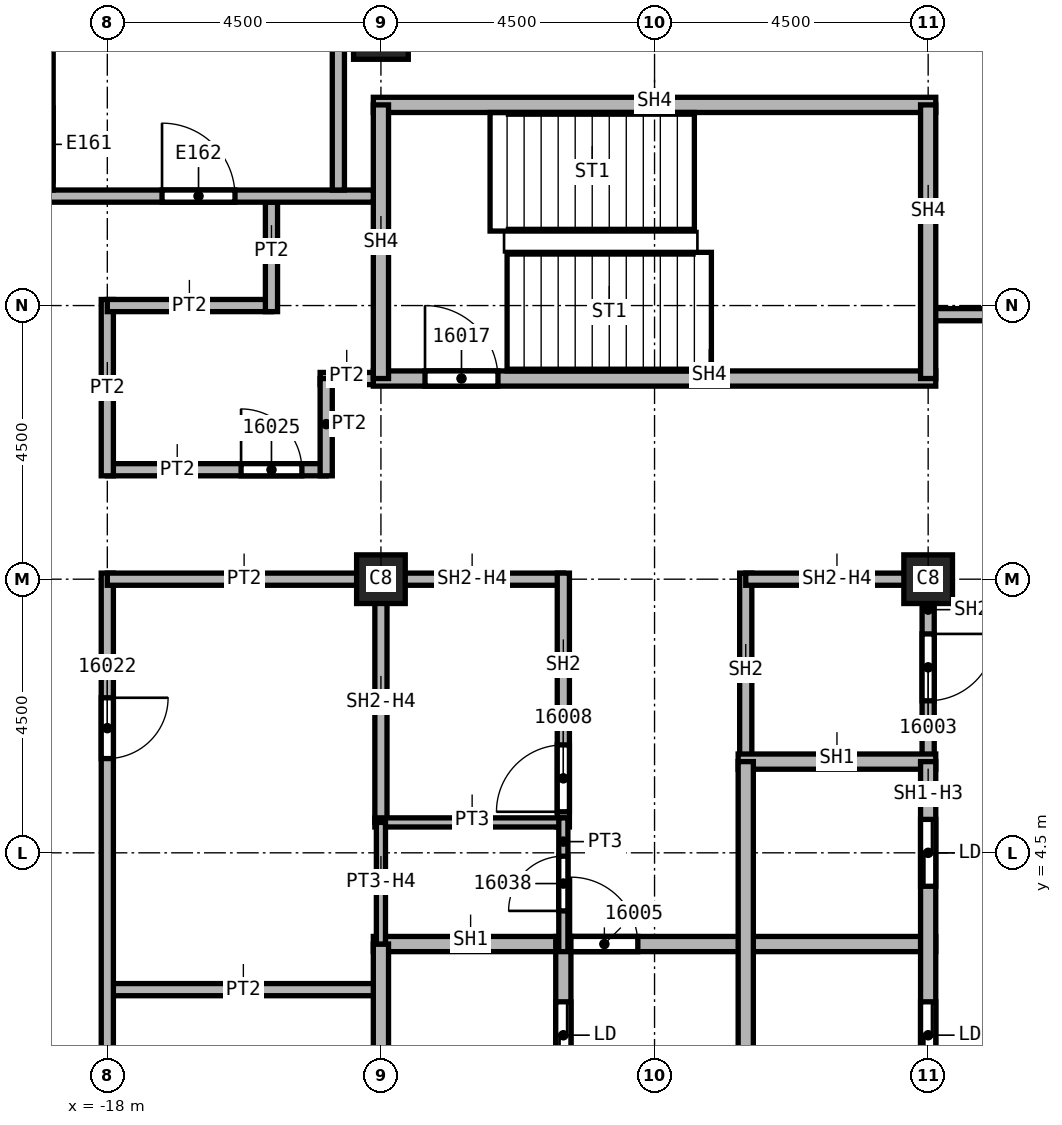
"""IFC4 building model, lengths in metres.
Left out: names, types, materials, properties, quantities, classifications, styles, units other than length and angle.
Written with IfcOpenShell. Run it as: python <this file> out.ifc"""

import sys

from ifc_helpers import new_model, si_unit, direction, frame, frame_2d, origin, origin_2d, place, context, subcontext, project, spatial, rectangle, extrude, element, fill, save


model = new_model("IFC4")
c1 = context("Model", 3, precision=1e-05, world=origin(), true_north=direction((0.0, 1.0)))
c2 = subcontext(c1, "Body", "Model", "MODEL_VIEW")
j1 = project(units=[si_unit("LENGTHUNIT", "METRE"), si_unit("PLANEANGLEUNIT", "RADIAN")], contexts=[c1])
p1 = place(None, origin())
s1 = spatial("IfcSite", under=j1, at=p1, CompositionType="ELEMENT")
p2 = place(p1, origin())
s2 = spatial("IfcBuilding", under=s1, at=p2, CompositionType="ELEMENT")
p3 = place(p2, frame((0.0, 0.0, 242.0)))
s3 = spatial("IfcBuildingStorey", under=s2, at=p3, CompositionType="ELEMENT", Elevation=242.0)
p4 = place(p3, frame((-13.5, 18.0, 0.0), z_axis=(0.0, 0.0, 1.0), x_axis=(1.0, 0.0, 0.0)))
e1 = element("IfcColumn", 1, at=p4, inside=s3, PredefinedType="COLUMN", context=c2, shape_type="SweptSolid", body=[
    extrude(rectangle(XDim=0.9, YDim=0.9, at=origin_2d()), origin(), (0.0, 0.0, 1.0), 3.72),
])
for number, where, z_axis, x_axis in (
    (2, (-4.5, 9.0, 0.0), (0.0, 0.0, 1.0), (1.0, 0.0, 0.0)),
    (3, (-13.5, 9.0, 0.0), (0.0, 0.0, 1.0), (1.0, 0.0, 0.0)),
):
    element("IfcColumn", number, at=place(p3, frame(where, z_axis=z_axis, x_axis=x_axis)), inside=s3, PredefinedType="COLUMN", context=c2, shape_type="SweptSolid", body=[
        extrude(rectangle(XDim=0.8, YDim=0.8, at=origin_2d()), origin(), (0.0, 0.0, 1.0), 3.72),
    ])
p5 = place(p3, frame((-18.0, 2.25, 0.0), z_axis=(0.0, 0.0, 1.0), x_axis=(1.0, 0.0, 0.0)))
e4 = element("IfcWall", 4, at=p5, inside=s3, PredefinedType="PARTITIONING", context=c2, shape_type="SweptSolid", body=[
    extrude(rectangle(XDim=4.5, YDim=0.2, at=frame_2d((2.25, 0.0))), origin(), (0.0, 0.0, 1.0), 3.72),
])
p6 = place(p3, frame((-18.0, 9.1, 0.0), z_axis=(0.0, 0.0, 1.0), x_axis=(0.0, -1.0, 0.0)))
e5 = element("IfcWall", 5, at=p6, inside=s3, PredefinedType="PARTITIONING", context=c2, shape_type="SweptSolid", body=[
    extrude(rectangle(XDim=17.8, YDim=0.2, at=frame_2d((8.9, 0.0))), origin(), (0.0, 0.0, 1.0), 3.72),
])
p7 = place(p6, frame((11.8, 0.0, 0.0)))
e6 = element("IfcOpeningElement", 6, at=p7, cuts=e5, PredefinedType="OPENING", context=c2, shape_type="SweptSolid", body=[
    extrude(rectangle(XDim=1.0, YDim=2.1, at=frame_2d((0.5, 1.05))), frame((0.0, 0.1, 0.0), z_axis=(0.0, -1.0, 0.0), x_axis=(1.0, 0.0, 0.0)), (0.0, 0.0, 1.0), 0.2),
])
p8 = place(p6, frame((2.05, 0.0, 0.0)))
e7 = element("IfcOpeningElement", 7, at=p8, cuts=e5, PredefinedType="OPENING", context=c2, shape_type="SweptSolid", body=[
    extrude(rectangle(XDim=1.0, YDim=2.1, at=frame_2d((0.5, 1.05))), frame((0.0, 0.1, 0.0), z_axis=(0.0, -1.0, 0.0), x_axis=(1.0, 0.0, 0.0)), (0.0, 0.0, 1.0), 0.2),
])
p9 = place(p3, frame((-18.0, 10.8, 0.0), z_axis=(0.0, 0.0, 1.0), x_axis=(1.0, 0.0, 0.0)))
e8 = element("IfcWall", 8, at=p9, inside=s3, PredefinedType="PARTITIONING", context=c2, shape_type="SweptSolid", body=[
    extrude(rectangle(XDim=3.6, YDim=0.2, at=frame_2d((1.8, 0.0))), origin(), (0.0, 0.0, 1.0), 3.72),
])
p10 = place(p9, frame((2.2, 0.0, 0.0)))
e9 = element("IfcOpeningElement", 9, at=p10, cuts=e8, PredefinedType="OPENING", context=c2, shape_type="SweptSolid", body=[
    extrude(rectangle(XDim=1.0, YDim=2.1, at=frame_2d((0.5, 1.05))), frame((0.0, 0.1, 0.0), z_axis=(0.0, -1.0, 0.0), x_axis=(1.0, 0.0, 0.0)), (0.0, 0.0, 1.0), 0.2),
])
p11 = place(p3, frame((-18.0, 13.6, 0.0), z_axis=(0.0, 0.0, 1.0), x_axis=(0.0, -1.0, 0.0)))
e10 = element("IfcWall", 10, at=p11, inside=s3, PredefinedType="PARTITIONING", context=c2, shape_type="SweptSolid", body=[
    extrude(rectangle(XDim=2.9, YDim=0.2, at=frame_2d((1.45, 0.0))), origin(), (0.0, 0.0, 1.0), 3.72),
])
p12 = place(p3, frame((-15.3, 13.5, 0.0), z_axis=(0.0, 0.0, 1.0), x_axis=(-1.0, 0.0, 0.0)))
e11 = element("IfcWall", 11, at=p12, inside=s3, PredefinedType="PARTITIONING", context=c2, shape_type="SweptSolid", body=[
    extrude(rectangle(XDim=2.7, YDim=0.2, at=frame_2d((1.35, 0.0))), origin(), (0.0, 0.0, 1.0), 3.72),
])
p13 = place(p3, frame((-15.3, 15.2, 0.0), z_axis=(0.0, 0.0, 1.0), x_axis=(0.0, -1.0, 0.0)))
e12 = element("IfcWall", 12, at=p13, inside=s3, PredefinedType="PARTITIONING", context=c2, shape_type="SweptSolid", body=[
    extrude(rectangle(XDim=1.8, YDim=0.2, at=frame_2d((0.9, 0.0))), origin(), (0.0, 0.0, 1.0), 3.72),
])
p14 = place(p3, frame((-14.5, 12.3, 0.0), z_axis=(0.0, 0.0, 1.0), x_axis=(1.0, 0.0, 0.0)))
e13 = element("IfcWall", 13, at=p14, inside=s3, PredefinedType="PARTITIONING", context=c2, shape_type="SweptSolid", body=[
    extrude(rectangle(XDim=1.125, YDim=0.2, at=frame_2d((0.562, 0.0))), origin(), (0.0, 0.0, 1.0), 3.72),
])
p15 = place(p3, frame((-13.5, 9.0, 0.0), z_axis=(0.0, 0.0, 1.0), x_axis=(-1.0, 0.0, 0.0)))
e14 = element("IfcWall", 14, at=p15, inside=s3, PredefinedType="PARTITIONING", context=c2, shape_type="SweptSolid", body=[
    extrude(rectangle(XDim=4.5, YDim=0.2, at=frame_2d((2.25, 0.0))), origin(), (0.0, 0.0, 1.0), 3.72),
])
p16 = place(p3, frame((-14.4, 10.7, 0.0), z_axis=(0.0, 0.0, 1.0), x_axis=(0.0, 1.0, 0.0)))
e15 = element("IfcWall", 15, at=p16, inside=s3, PredefinedType="PARTITIONING", context=c2, shape_type="SweptSolid", body=[
    extrude(rectangle(XDim=1.6, YDim=0.2, at=frame_2d((0.8, 0.0))), origin(), (0.0, 0.0, 1.0), 3.72),
])
p17 = place(p3, frame((-4.5, 13.35, 0.0), z_axis=(0.0, 0.0, 1.0), x_axis=(1.0, 0.0, 0.0)))
e16 = element("IfcWall", 16, at=p17, inside=s3, PredefinedType="PARTITIONING", context=c2, shape_type="SweptSolid", body=[
    extrude(rectangle(XDim=3.6, YDim=0.2, at=frame_2d((1.8, 0.0))), origin(), (0.0, 0.0, 1.0), 3.118),
])
p18 = place(p3, frame((-13.6, 9.0, 0.0), z_axis=(0.0, 0.0, 1.0), x_axis=(1.0, 0.0, 0.0)))
e17 = element("IfcWall", 17, at=p18, inside=s3, PredefinedType="SOLIDWALL", context=c2, shape_type="SweptSolid", body=[
    extrude(rectangle(XDim=3.1, YDim=0.2, at=frame_2d((1.55, 0.0))), origin(), (0.0, 0.0, 1.0), 3.042),
])
p19 = place(p3, frame((-13.5, 5.0, 0.0), z_axis=(0.0, 0.0, 1.0), x_axis=(0.0, 1.0, 0.0)))
e18 = element("IfcWall", 18, at=p19, inside=s3, PredefinedType="SOLIDWALL", context=c2, shape_type="SweptSolid", body=[
    extrude(rectangle(XDim=4.1, YDim=0.2, at=frame_2d((2.05, 0.0))), origin(), (0.0, 0.0, 1.0), 3.042),
])
p20 = place(p3, frame((-10.5, 4.925, 0.0), z_axis=(0.0, 0.0, 1.0), x_axis=(0.0, 1.0, 0.0)))
e19 = element("IfcWall", 19, at=p20, inside=s3, PredefinedType="SOLIDWALL", context=c2, shape_type="SweptSolid", body=[
    extrude(rectangle(XDim=4.175, YDim=0.2, at=frame_2d((2.087, 0.0))), origin(), (0.0, 0.0, 1.0), 3.72),
])
p21 = place(p20, frame((0.25, 0.0, 0.0)))
e20 = element("IfcOpeningElement", 20, at=p21, cuts=e19, PredefinedType="OPENING", context=c2, shape_type="SweptSolid", body=[
    extrude(rectangle(XDim=1.1, YDim=2.1, at=frame_2d((0.55, 1.05))), frame((0.0, 0.1, 0.0), z_axis=(0.0, -1.0, 0.0), x_axis=(1.0, 0.0, 0.0)), (0.0, 0.0, 1.0), 0.2),
])
p22 = place(p3, frame((-7.5, 6.0, 0.0), z_axis=(0.0, 0.0, 1.0), x_axis=(0.0, 1.0, 0.0)))
e21 = element("IfcWall", 21, at=p22, inside=s3, PredefinedType="SOLIDWALL", context=c2, shape_type="SweptSolid", body=[
    extrude(rectangle(XDim=3.1, YDim=0.2, at=frame_2d((1.55, 0.0))), origin(), (0.0, 0.0, 1.0), 3.72),
])
p23 = place(p3, frame((-7.5, 9.0, 0.0), z_axis=(0.0, 0.0, 1.0), x_axis=(1.0, 0.0, 0.0)))
e22 = element("IfcWall", 22, at=p23, inside=s3, PredefinedType="SOLIDWALL", context=c2, shape_type="SweptSolid", body=[
    extrude(rectangle(XDim=3.0, YDim=0.2, at=frame_2d((1.5, 0.0))), origin(), (0.0, 0.0, 1.0), 3.042),
])
p24 = place(p3, frame((-4.5, 9.1, 0.0), z_axis=(0.0, 0.0, 1.0), x_axis=(0.0, -1.0, 0.0)))
e23 = element("IfcWall", 23, at=p24, inside=s3, PredefinedType="SOLIDWALL", context=c2, shape_type="SweptSolid", body=[
    extrude(rectangle(XDim=3.1, YDim=0.2, at=frame_2d((1.55, 0.0))), origin(), (0.0, 0.0, 1.0), 3.042),
])
p25 = place(p24, frame((1.0, 0.0, 0.0)))
e24 = element("IfcOpeningElement", 24, at=p25, cuts=e23, PredefinedType="OPENING", context=c2, shape_type="SweptSolid", body=[
    extrude(rectangle(XDim=1.1, YDim=2.1, at=frame_2d((0.55, 1.05))), frame((0.0, 0.1, 0.0), z_axis=(0.0, -1.0, 0.0), x_axis=(1.0, 0.0, 0.0)), (0.0, 0.0, 1.0), 0.2),
])
p26 = place(p3, frame((-13.625, 3.0, 0.0), z_axis=(0.0, 0.0, 1.0), x_axis=(1.0, 0.0, 0.0)))
e25 = element("IfcWall", 25, at=p26, inside=s3, PredefinedType="SOLIDWALL", context=c2, shape_type="SweptSolid", body=[
    extrude(rectangle(XDim=9.25, YDim=0.25, at=frame_2d((4.625, 0.0))), origin(), (0.0, 0.0, 1.0), 3.72),
])
p27 = place(p26, frame((3.25, 0.0, 0.0)))
e26 = element("IfcOpeningElement", 26, at=p27, cuts=e25, PredefinedType="OPENING", context=c2, shape_type="SweptSolid", body=[
    extrude(rectangle(XDim=1.1, YDim=2.1, at=frame_2d((0.55, 1.05))), frame((0.0, 0.125, 0.0), z_axis=(0.0, -1.0, 0.0), x_axis=(1.0, 0.0, 0.0)), (0.0, 0.0, 1.0), 0.25),
])
p28 = place(p3, frame((-13.5, -3.0, 0.0), z_axis=(0.0, 0.0, 1.0), x_axis=(0.0, 1.0, 0.0)))
e27 = element("IfcWall", 27, at=p28, inside=s3, PredefinedType="SOLIDWALL", context=c2, shape_type="SweptSolid", body=[
    extrude(rectangle(XDim=6.0, YDim=0.25, at=frame_2d((3.0, 0.0))), origin(), (0.0, 0.0, 1.0), 3.042),
])
p29 = place(p3, frame((-10.5, -3.125, 0.0), z_axis=(0.0, 0.0, 1.0), x_axis=(0.0, 1.0, 0.0)))
e28 = element("IfcWall", 28, at=p29, inside=s3, PredefinedType="SOLIDWALL", context=c2, shape_type="SweptSolid", body=[
    extrude(rectangle(XDim=6.25, YDim=0.25, at=frame_2d((3.125, 0.0))), origin(), (0.0, 0.0, 1.0), 3.72),
])
p30 = place(p29, frame((1.075, 0.0, 0.0)))
e29 = element("IfcOpeningElement", 29, at=p30, cuts=e28, PredefinedType="OPENING", context=c2, shape_type="SweptSolid", body=[
    extrude(rectangle(XDim=1.1, YDim=2.1, at=frame_2d((0.55, 1.05))), frame((0.0, 0.125, 0.0), z_axis=(0.0, -1.0, 0.0), x_axis=(1.0, 0.0, 0.0)), (0.0, 0.0, 1.0), 0.25),
])
p31 = place(p29, frame((4.075, 0.0, 0.0)))
e30 = element("IfcOpeningElement", 30, at=p31, cuts=e28, PredefinedType="OPENING", context=c2, shape_type="SweptSolid", body=[
    extrude(rectangle(XDim=1.1, YDim=2.1, at=frame_2d((0.55, 1.05))), frame((0.0, 0.125, 0.0), z_axis=(0.0, -1.0, 0.0), x_axis=(1.0, 0.0, 0.0)), (0.0, 0.0, 1.0), 0.25),
])
p32 = place(p3, frame((-7.625, 6.0, 0.0), z_axis=(0.0, 0.0, 1.0), x_axis=(1.0, 0.0, 0.0)))
e31 = element("IfcWall", 31, at=p32, inside=s3, PredefinedType="SOLIDWALL", context=c2, shape_type="SweptSolid", body=[
    extrude(rectangle(XDim=3.25, YDim=0.25, at=frame_2d((1.625, 0.0))), origin(), (0.0, 0.0, 1.0), 3.72),
])
p33 = place(p3, frame((-7.5, -3.125, 0.0), z_axis=(0.0, 0.0, 1.0), x_axis=(0.0, 1.0, 0.0)))
e32 = element("IfcWall", 32, at=p33, inside=s3, PredefinedType="SOLIDWALL", context=c2, shape_type="SweptSolid", body=[
    extrude(rectangle(XDim=9.125, YDim=0.25, at=frame_2d((4.562, 0.0))), origin(), (0.0, 0.0, 1.0), 3.72),
])
p34 = place(p3, frame((-4.5, 6.0, 0.0), z_axis=(0.0, 0.0, 1.0), x_axis=(0.0, -1.0, 0.0)))
e33 = element("IfcWall", 33, at=p34, inside=s3, PredefinedType="SOLIDWALL", context=c2, shape_type="SweptSolid", body=[
    extrude(rectangle(XDim=6.0, YDim=0.25, at=frame_2d((3.0, 0.0))), origin(), (0.0, 0.0, 1.0), 3.042),
])
p35 = place(p34, frame((3.95, 0.0, 0.0)))
e34 = element("IfcOpeningElement", 34, at=p35, cuts=e33, PredefinedType="OPENING", context=c2, shape_type="SweptSolid", body=[
    extrude(rectangle(XDim=1.1, YDim=2.1, at=frame_2d((0.55, 1.05))), frame((0.0, 0.125, 0.0), z_axis=(0.0, -1.0, 0.0), x_axis=(1.0, 0.0, 0.0)), (0.0, 0.0, 1.0), 0.25),
])
p36 = place(p34, frame((0.95, 0.0, 0.0)))
e35 = element("IfcOpeningElement", 35, at=p36, cuts=e33, PredefinedType="OPENING", context=c2, shape_type="SweptSolid", body=[
    extrude(rectangle(XDim=1.1, YDim=2.1, at=frame_2d((0.55, 1.05))), frame((0.0, 0.125, 0.0), z_axis=(0.0, -1.0, 0.0), x_axis=(1.0, 0.0, 0.0)), (0.0, 0.0, 1.0), 0.25),
])
p37 = place(p3, frame((-13.625, 12.3, 0.0), z_axis=(0.0, 0.0, 1.0), x_axis=(1.0, 0.0, 0.0)))
e36 = element("IfcWall", 36, at=p37, inside=s3, PredefinedType="SOLIDWALL", context=c2, shape_type="SweptSolid", body=[
    extrude(rectangle(XDim=9.25, YDim=0.25, at=frame_2d((4.625, 0.0))), origin(), (0.0, 0.0, 1.0), 3.72),
])
p38 = place(p37, frame((0.85, 0.0, 0.0)))
e37 = element("IfcOpeningElement", 37, at=p38, cuts=e36, PredefinedType="OPENING", context=c2, shape_type="SweptSolid", body=[
    extrude(rectangle(XDim=1.2, YDim=2.1, at=frame_2d((0.6, 1.05))), frame((0.0, 0.125, 0.0), z_axis=(0.0, -1.0, 0.0), x_axis=(1.0, 0.0, 0.0)), (0.0, 0.0, 1.0), 0.25),
])
p39 = place(p3, frame((-13.625, 16.8, 0.0), z_axis=(0.0, 0.0, 1.0), x_axis=(1.0, 0.0, 0.0)))
e38 = element("IfcWall", 38, at=p39, inside=s3, PredefinedType="SOLIDWALL", context=c2, shape_type="SweptSolid", body=[
    extrude(rectangle(XDim=9.25, YDim=0.25, at=frame_2d((4.625, 0.0))), origin(), (0.0, 0.0, 1.0), 3.72),
])
for number, where, z_axis, x_axis in (
    (39, (-13.5, 12.3, 0.0), (0.0, 0.0, 1.0), (0.0, 1.0, 0.0)),
    (40, (-4.5, 16.8, 0.0), (0.0, 0.0, 1.0), (0.0, -1.0, 0.0)),
):
    element("IfcWall", number, at=place(p3, frame(where, z_axis=z_axis, x_axis=x_axis)), inside=s3, PredefinedType="SOLIDWALL", context=c2, shape_type="SweptSolid", body=[
        extrude(rectangle(XDim=4.5, YDim=0.25, at=frame_2d((2.25, 0.0))), origin(), (0.0, 0.0, 1.0), 3.72),
    ])
p40 = place(p3, frame((-13.6, 5.0, 0.0), z_axis=(0.0, 0.0, 1.0), x_axis=(1.0, 0.0, 0.0)))
e41 = element("IfcWall", 41, at=p40, inside=s3, PredefinedType="PARTITIONING", context=c2, shape_type="SweptSolid", body=[
    extrude(rectangle(XDim=3.1, YDim=0.15, at=frame_2d((1.55, 0.0))), origin(), (0.0, 0.0, 1.0), 3.72),
])
p41 = place(p3, frame((-13.5, 3.0, 0.0), z_axis=(0.0, 0.0, 1.0), x_axis=(0.0, 1.0, 0.0)))
e42 = element("IfcWall", 42, at=p41, inside=s3, PredefinedType="PARTITIONING", context=c2, shape_type="SweptSolid", body=[
    extrude(rectangle(XDim=2.0, YDim=0.15, at=frame_2d((1.0, 0.0))), origin(), (0.0, 0.0, 1.0), 3.042),
])
p42 = place(p3, frame((-10.5, 2.875, 0.0), z_axis=(0.0, 0.0, 1.0), x_axis=(0.0, 1.0, 0.0)))
e43 = element("IfcWall", 43, at=p42, inside=s3, PredefinedType="PARTITIONING", context=c2, shape_type="SweptSolid", body=[
    extrude(rectangle(XDim=2.2, YDim=0.15, at=frame_2d((1.1, 0.0))), origin(), (0.0, 0.0, 1.0), 3.72),
])
p43 = place(p42, frame((0.67, 0.0, 0.0)))
e44 = element("IfcOpeningElement", 44, at=p43, cuts=e43, PredefinedType="OPENING", context=c2, shape_type="SweptSolid", body=[
    extrude(rectangle(XDim=0.9, YDim=2.1, at=frame_2d((0.45, 1.05))), frame((0.0, 0.075, 0.0), z_axis=(0.0, -1.0, 0.0), x_axis=(1.0, 0.0, 0.0)), (0.0, 0.0, 1.0), 0.15),
])
p44 = place(p3, frame((-21.9, 15.3, 0.0), z_axis=(0.0, 0.0, 1.0), x_axis=(1.0, 0.0, 0.0)))
e45 = element("IfcWall", 45, at=p44, inside=s3, PredefinedType="SOLIDWALL", context=c2, shape_type="SweptSolid", body=[
    extrude(rectangle(XDim=8.275, YDim=0.2, at=frame_2d((4.137, 0.0))), origin(), (0.0, 0.0, 1.0), 3.72),
])
p45 = place(p44, frame((4.8, 0.0, 0.0)))
e46 = element("IfcOpeningElement", 46, at=p45, cuts=e45, PredefinedType="OPENING", context=c2, shape_type="SweptSolid", body=[
    extrude(rectangle(XDim=1.2, YDim=2.1, at=frame_2d((0.6, 1.05))), frame((0.0, 0.1, 0.0), z_axis=(0.0, -1.0, 0.0), x_axis=(1.0, 0.0, 0.0)), (0.0, 0.0, 1.0), 0.2),
])
p46 = place(p3, frame((-14.2, 15.4, 0.0), z_axis=(0.0, 0.0, 1.0), x_axis=(0.0, 1.0, 0.0)))
e47 = element("IfcWall", 47, at=p46, inside=s3, PredefinedType="SOLIDWALL", context=c2, shape_type="SweptSolid", body=[
    extrude(rectangle(XDim=5.9, YDim=0.2, at=frame_2d((2.95, 0.0))), origin(), (0.0, 0.0, 1.0), 3.72),
])
p47 = place(p3, frame((-18.99, 15.4, 0.0), z_axis=(0.0, 0.0, 1.0), x_axis=(0.0, 1.0, 0.0)))
e48 = element("IfcWall", 48, at=p47, inside=s3, PredefinedType="SOLIDWALL", context=c2, shape_type="SweptSolid", body=[
    extrude(rectangle(XDim=5.9, YDim=0.2, at=frame_2d((2.95, 0.0))), origin(), (0.0, 0.0, 1.0), 3.72),
])
p48 = place(p47, frame((0.15, 0.0, 0.0)))
e49 = element("IfcOpeningElement", 49, at=p48, cuts=e48, PredefinedType="OPENING", context=c2, shape_type="SweptSolid", body=[
    extrude(rectangle(XDim=1.2, YDim=2.1, at=frame_2d((0.6, 1.05))), frame((0.0, 0.1, 0.0), z_axis=(0.0, -1.0, 0.0), x_axis=(1.0, 0.0, 0.0)), (0.0, 0.0, 1.0), 0.2),
])
p49 = place(p25, origin())
e50 = element("IfcDoor", 50, at=p49, inside=s3, OperationType="SINGLE_SWING_RIGHT", PredefinedType="DOOR", context=c2, shape_type="SweptSolid", body=[
    extrude(rectangle(XDim=1.1, YDim=2.1, at=frame_2d((0.55, 1.05))), frame((0.0, 0.025, 0.0), z_axis=(0.0, -1.0, 0.0), x_axis=(1.0, 0.0, 0.0)), (0.0, 0.0, 1.0), 0.05),
])
fill(e24, e50)
p50 = place(p27, origin())
e51 = element("IfcDoor", 51, at=p50, inside=s3, OperationType="SINGLE_SWING_RIGHT", PredefinedType="DOOR", context=c2, shape_type="SweptSolid", body=[
    extrude(rectangle(XDim=1.1, YDim=2.1, at=frame_2d((0.55, 1.05))), frame((0.0, 0.025, 0.0), z_axis=(0.0, -1.0, 0.0), x_axis=(1.0, 0.0, 0.0)), (0.0, 0.0, 1.0), 0.05),
])
fill(e26, e51)
p51 = place(p21, origin())
e52 = element("IfcDoor", 52, at=p51, inside=s3, OperationType="SINGLE_SWING_LEFT", PredefinedType="DOOR", context=c2, shape_type="SweptSolid", body=[
    extrude(rectangle(XDim=1.1, YDim=2.1, at=frame_2d((0.55, 1.05))), frame((0.0, 0.025, 0.0), z_axis=(0.0, -1.0, 0.0), x_axis=(1.0, 0.0, 0.0)), (0.0, 0.0, 1.0), 0.05),
])
fill(e20, e52)
p52 = place(p38, origin())
e53 = element("IfcDoor", 53, at=p52, inside=s3, OperationType="SINGLE_SWING_RIGHT", PredefinedType="DOOR", context=c2, shape_type="SweptSolid", body=[
    extrude(rectangle(XDim=1.2, YDim=2.1, at=frame_2d((0.6, 1.05))), frame((0.0, 0.025, 0.0), z_axis=(0.0, -1.0, 0.0), x_axis=(1.0, 0.0, 0.0)), (0.0, 0.0, 1.0), 0.05),
])
fill(e37, e53)
p53 = place(p8, origin())
e54 = element("IfcDoor", 54, at=p53, inside=s3, OperationType="SINGLE_SWING_LEFT", PredefinedType="DOOR", context=c2, shape_type="SweptSolid", body=[
    extrude(rectangle(XDim=1.0, YDim=2.1, at=frame_2d((0.5, 1.05))), frame((0.0, 0.025, 0.0), z_axis=(0.0, -1.0, 0.0), x_axis=(1.0, 0.0, 0.0)), (0.0, 0.0, 1.0), 0.05),
])
fill(e7, e54)
p54 = place(p10, origin())
e55 = element("IfcDoor", 55, at=p54, inside=s3, OperationType="SINGLE_SWING_RIGHT", PredefinedType="DOOR", context=c2, shape_type="SweptSolid", body=[
    extrude(rectangle(XDim=1.0, YDim=2.1, at=frame_2d((0.5, 1.05))), frame((0.0, 0.025, 0.0), z_axis=(0.0, -1.0, 0.0), x_axis=(1.0, 0.0, 0.0)), (0.0, 0.0, 1.0), 0.05),
])
fill(e9, e55)
p55 = place(p43, origin())
e56 = element("IfcDoor", 56, at=p55, inside=s3, OperationType="SINGLE_SWING_LEFT", PredefinedType="DOOR", context=c2, shape_type="SweptSolid", body=[
    extrude(rectangle(XDim=0.9, YDim=2.1, at=frame_2d((0.45, 1.05))), frame((0.0, 0.025, 0.0), z_axis=(0.0, -1.0, 0.0), x_axis=(1.0, 0.0, 0.0)), (0.0, 0.0, 1.0), 0.05),
])
fill(e44, e56)
p56 = place(p35, origin())
e57 = element("IfcDoor", 57, at=p56, inside=s3, OperationType="SLIDING_TO_LEFT", PredefinedType="DOOR", context=c2, shape_type="SweptSolid", body=[
    extrude(rectangle(XDim=1.1, YDim=2.1, at=frame_2d((0.55, 1.05))), frame((0.0, 0.025, 0.0), z_axis=(0.0, -1.0, 0.0), x_axis=(1.0, 0.0, 0.0)), (0.0, 0.0, 1.0), 0.05),
])
fill(e34, e57)
p57 = place(p36, origin())
e58 = element("IfcDoor", 58, at=p57, inside=s3, OperationType="SLIDING_TO_LEFT", PredefinedType="DOOR", context=c2, shape_type="SweptSolid", body=[
    extrude(rectangle(XDim=1.1, YDim=2.1, at=frame_2d((0.55, 1.05))), frame((0.0, 0.025, 0.0), z_axis=(0.0, -1.0, 0.0), x_axis=(1.0, 0.0, 0.0)), (0.0, 0.0, 1.0), 0.05),
])
fill(e35, e58)
p58 = place(p31, origin())
e59 = element("IfcDoor", 59, at=p58, inside=s3, OperationType="SLIDING_TO_LEFT", PredefinedType="DOOR", context=c2, shape_type="SweptSolid", body=[
    extrude(rectangle(XDim=1.1, YDim=2.1, at=frame_2d((0.55, 1.05))), frame((0.0, 0.025, 0.0), z_axis=(0.0, -1.0, 0.0), x_axis=(1.0, 0.0, 0.0)), (0.0, 0.0, 1.0), 0.05),
])
fill(e30, e59)
p59 = place(p45, origin())
e60 = element("IfcDoor", 60, at=p59, inside=s3, OperationType="SINGLE_SWING_RIGHT", PredefinedType="DOOR", context=c2, shape_type="SweptSolid", body=[
    extrude(rectangle(XDim=1.2, YDim=2.1, at=frame_2d((0.6, 1.05))), frame((0.0, 0.025, 0.0), z_axis=(0.0, -1.0, 0.0), x_axis=(1.0, 0.0, 0.0)), (0.0, 0.0, 1.0), 0.05),
])
fill(e46, e60)
save(model, sys.argv[1])
